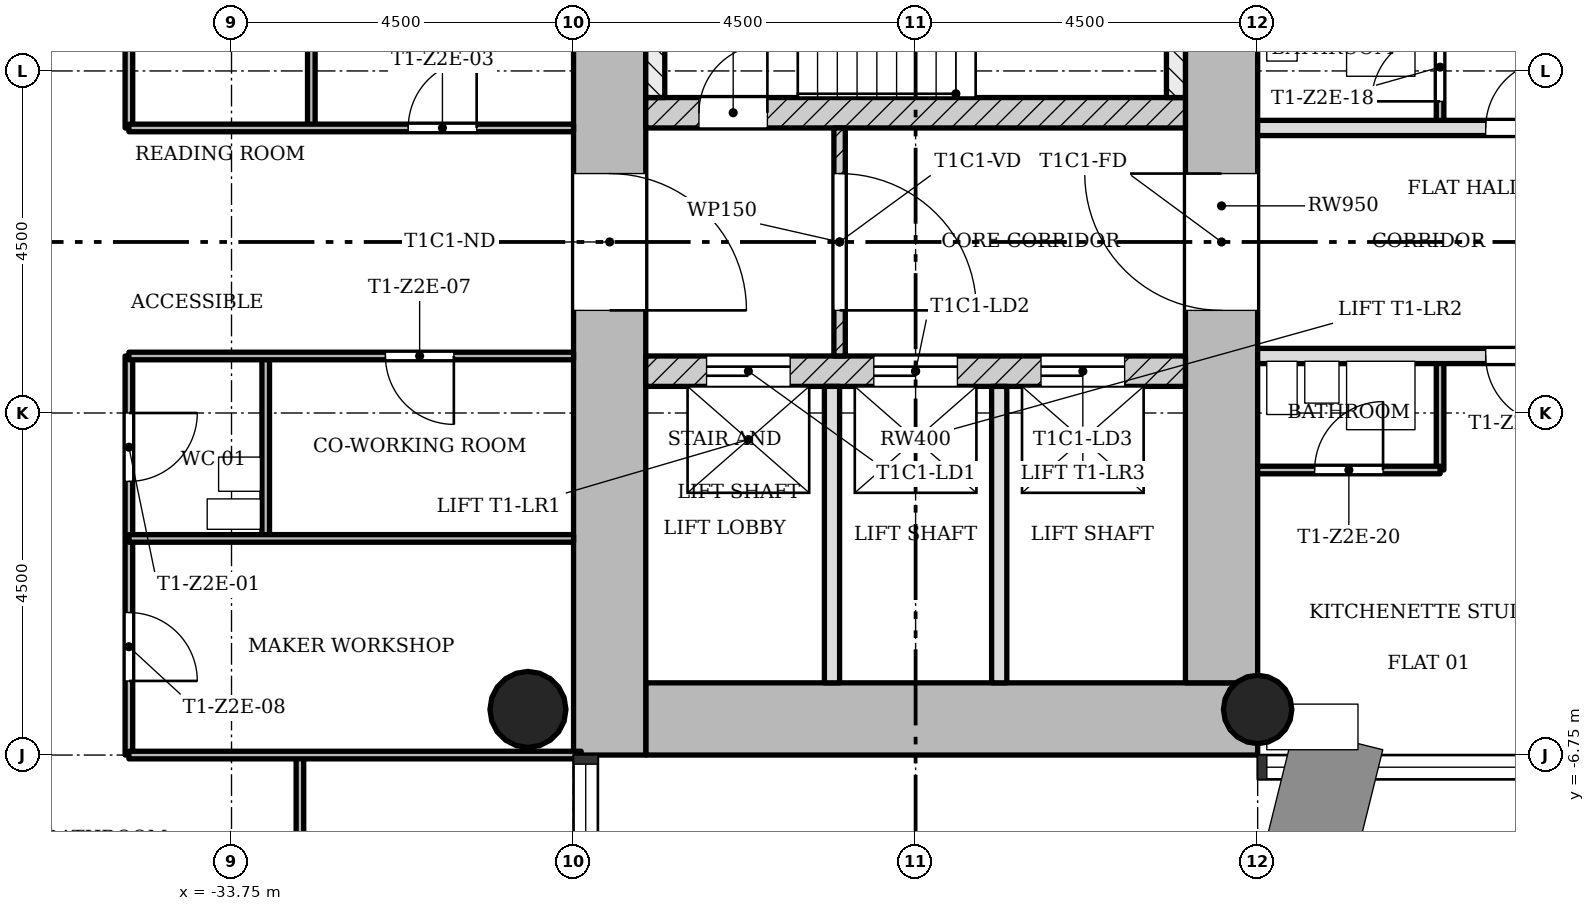
"""IFC4 building model, lengths in metres.
Left out: names, types, materials, properties, quantities, classifications, styles, units other than length and angle.
Written with IfcOpenShell. Run it as: python <this file> out.ifc"""

import sys

from ifc_helpers import new_model, si_unit, direction, frame, frame_2d, origin, origin_2d, place, context, subcontext, project, spatial, rectangle, hollow_circle, extrude, element, fill, save


model = new_model("IFC4")
c1 = context("Model", 3, precision=1e-05, world=origin(), true_north=direction((0.0, 1.0)))
c2 = subcontext(c1, "Body", "Model", "MODEL_VIEW")
j1 = project(units=[si_unit("LENGTHUNIT", "METRE"), si_unit("PLANEANGLEUNIT", "RADIAN")], contexts=[c1])
p1 = place(None, origin())
s1 = spatial("IfcSite", under=j1, at=p1, CompositionType="ELEMENT")
p2 = place(p1, origin())
s2 = spatial("IfcBuilding", under=s1, at=p2, CompositionType="ELEMENT")
p3 = place(p2, frame((0.0, 0.0, 100.4)))
s3 = spatial("IfcBuildingStorey", under=s2, at=p3, CompositionType="ELEMENT", Elevation=100.4)
p4 = place(p3, frame((-28.3, -6.275, 0.0), z_axis=(0.0, 0.0, 1.0), x_axis=(1.0, 0.0, 0.0)))
e1 = element("IfcWall", 1, at=p4, inside=s3, PredefinedType="SHEAR", context=c2, shape_type="SweptSolid", body=[
    extrude(rectangle(XDim=8.05, YDim=0.95, at=frame_2d((4.025, 0.0))), origin(), (0.0, 0.0, 1.0), 3.4),
])
p5 = place(p3, frame((-20.725, -5.8, 0.0), z_axis=(0.0, 0.0, 1.0), x_axis=(0.0, 1.0, 0.0)))
e2 = element("IfcWall", 2, at=p5, inside=s3, PredefinedType="SHEAR", context=c2, shape_type="SweptSolid", body=[
    extrude(rectangle(XDim=12.55, YDim=0.95, at=frame_2d((6.275, 0.0))), origin(), (0.0, 0.0, 1.0), 3.4),
])
p6 = place(p5, frame((4.9, 0.0, 0.0)))
e3 = element("IfcOpeningElement", 3, at=p6, cuts=e2, PredefinedType="OPENING", context=c2, shape_type="SweptSolid", body=[
    extrude(rectangle(XDim=1.8, YDim=2.1, at=frame_2d((0.9, 1.05))), frame((0.0, 0.485, 0.0), z_axis=(0.0, -1.0, 0.0), x_axis=(1.0, 0.0, 0.0)), (0.0, 0.0, 1.0), 0.97),
])
p7 = place(p3, frame((-28.775, 5.8, 0.0), z_axis=(0.0, 0.0, 1.0), x_axis=(0.0, -1.0, 0.0)))
e4 = element("IfcWall", 4, at=p7, inside=s3, PredefinedType="SHEAR", context=c2, shape_type="SweptSolid", body=[
    extrude(rectangle(XDim=12.55, YDim=0.95, at=frame_2d((6.275, 0.0))), origin(), (0.0, 0.0, 1.0), 3.4),
])
p8 = place(p7, frame((4.9, 0.0, 0.0)))
e5 = element("IfcOpeningElement", 5, at=p8, cuts=e4, PredefinedType="OPENING", context=c2, shape_type="SweptSolid", body=[
    extrude(rectangle(XDim=1.8, YDim=2.1, at=frame_2d((0.9, 1.05))), frame((0.0, 0.485, 0.0), z_axis=(0.0, -1.0, 0.0), x_axis=(1.0, 0.0, 0.0)), (0.0, 0.0, 1.0), 0.97),
])
p9 = place(p3, frame((-28.3, -1.7, 0.0), z_axis=(0.0, 0.0, 1.0), x_axis=(1.0, 0.0, 0.0)))
e6 = element("IfcWall", 6, at=p9, inside=s3, PredefinedType="SHEAR", context=c2, shape_type="SweptSolid", body=[
    extrude(rectangle(XDim=7.1, YDim=0.4, at=frame_2d((3.55, 0.0))), origin(), (0.0, 0.0, 1.0), 3.4),
])
p10 = place(p9, frame((0.8, 0.0, 0.0)))
e7 = element("IfcOpeningElement", 7, at=p10, cuts=e6, PredefinedType="OPENING", context=c2, shape_type="SweptSolid", body=[
    extrude(rectangle(XDim=1.1, YDim=2.1, at=frame_2d((0.55, 1.05))), frame((0.0, 0.21, 0.0), z_axis=(0.0, -1.0, 0.0), x_axis=(1.0, 0.0, 0.0)), (0.0, 0.0, 1.0), 0.42),
])
p11 = place(p9, frame((3.0, 0.0, 0.0)))
e8 = element("IfcOpeningElement", 8, at=p11, cuts=e6, PredefinedType="OPENING", context=c2, shape_type="SweptSolid", body=[
    extrude(rectangle(XDim=1.1, YDim=2.1, at=frame_2d((0.55, 1.05))), frame((0.0, 0.21, 0.0), z_axis=(0.0, -1.0, 0.0), x_axis=(1.0, 0.0, 0.0)), (0.0, 0.0, 1.0), 0.42),
])
p12 = place(p9, frame((5.2, 0.0, 0.0)))
e9 = element("IfcOpeningElement", 9, at=p12, cuts=e6, PredefinedType="OPENING", context=c2, shape_type="SweptSolid", body=[
    extrude(rectangle(XDim=1.1, YDim=2.1, at=frame_2d((0.55, 1.05))), frame((0.0, 0.21, 0.0), z_axis=(0.0, -1.0, 0.0), x_axis=(1.0, 0.0, 0.0)), (0.0, 0.0, 1.0), 0.42),
])
p13 = place(p3, frame((-28.3, 1.7, 0.0), z_axis=(0.0, 0.0, 1.0), x_axis=(1.0, 0.0, 0.0)))
e10 = element("IfcWall", 10, at=p13, inside=s3, PredefinedType="SHEAR", context=c2, shape_type="SweptSolid", body=[
    extrude(rectangle(XDim=7.1, YDim=0.4, at=frame_2d((3.55, 0.0))), origin(), (0.0, 0.0, 1.0), 3.4),
])
p14 = place(p13, frame((0.7, 0.0, 0.0)))
e11 = element("IfcOpeningElement", 11, at=p14, cuts=e10, PredefinedType="OPENING", context=c2, shape_type="SweptSolid", body=[
    extrude(rectangle(XDim=0.9, YDim=2.1, at=frame_2d((0.45, 1.05))), frame((0.0, 0.21, 0.0), z_axis=(0.0, -1.0, 0.0), x_axis=(1.0, 0.0, 0.0)), (0.0, 0.0, 1.0), 0.42),
])
p15 = place(p3, frame((-20.25, -6.15, 0.0), z_axis=(0.0, 0.0, 1.0), x_axis=(1.0, 0.0, 0.0)))
e12 = element("IfcColumn", 12, at=p15, inside=s3, PredefinedType="COLUMN", context=c2, shape_type="SweptSolid", body=[
    extrude(hollow_circle(Radius=0.45, WallThickness=0.032, at=origin_2d()), origin(), (0.0, 0.0, 1.0), 3.4),
])
p16 = place(p3, frame((-29.85, -6.15, 0.0), z_axis=(0.0, 0.0, 1.0), x_axis=(1.0, 0.0, 0.0)))
e13 = element("IfcColumn", 13, at=p16, inside=s3, PredefinedType="COLUMN", context=c2, shape_type="SweptSolid", body=[
    extrude(hollow_circle(Radius=0.5, WallThickness=0.036, at=origin_2d()), origin(), (0.0, 0.0, 1.0), 3.4),
])
p17 = place(p3, frame((-25.75, -1.5, 0.0), z_axis=(0.0, 0.0, 1.0), x_axis=(0.0, 1.0, 0.0)))
e14 = element("IfcWall", 14, at=p17, inside=s3, PredefinedType="PARTITIONING", context=c2, shape_type="SweptSolid", body=[
    extrude(rectangle(XDim=3.0, YDim=0.15, at=frame_2d((1.5, 0.0))), origin(), (0.0, 0.0, 1.0), 3.0),
])
p18 = place(p17, frame((0.6, 0.0, 0.0)))
e15 = element("IfcOpeningElement", 15, at=p18, cuts=e14, PredefinedType="OPENING", context=c2, shape_type="SweptSolid", body=[
    extrude(rectangle(XDim=1.8, YDim=2.1, at=frame_2d((0.9, 1.05))), frame((0.0, 0.085, 0.0), z_axis=(0.0, -1.0, 0.0), x_axis=(1.0, 0.0, 0.0)), (0.0, 0.0, 1.0), 0.17),
])
for number, where, z_axis, x_axis in (
    (16, (-25.85, -5.8, 0.0), (0.0, 0.0, 1.0), (0.0, 1.0, 0.0)),
    (17, (-23.65, -5.8, 0.0), (0.0, 0.0, 1.0), (0.0, 1.0, 0.0)),
):
    element("IfcWall", number, at=place(p3, frame(where, z_axis=z_axis, x_axis=x_axis)), inside=s3, PredefinedType="SOLIDWALL", context=c2, shape_type="SweptSolid", body=[
        extrude(rectangle(XDim=3.9, YDim=0.2, at=frame_2d((1.95, 0.0))), origin(), (0.0, 0.0, 1.0), 3.0),
    ])
p19 = place(p3, frame((-35.1, -6.75, 0.0), z_axis=(0.0, 0.0, 1.0), x_axis=(0.0, 1.0, 0.0)))
e18 = element("IfcWall", 18, at=p19, inside=s3, PredefinedType="PARTITIONING", context=c2, shape_type="SweptSolid", body=[
    extrude(rectangle(XDim=5.25, YDim=0.1, at=frame_2d((2.625, 0.0))), origin(), (0.0, 0.0, 1.0), 3.0),
])
p20 = place(p19, frame((3.6, 0.0, 0.0)))
e19 = element("IfcOpeningElement", 19, at=p20, cuts=e18, PredefinedType="OPENING", context=c2, shape_type="SweptSolid", body=[
    extrude(rectangle(XDim=0.9, YDim=2.1, at=frame_2d((0.45, 1.05))), frame((0.0, 0.06, 0.0), z_axis=(0.0, -1.0, 0.0), x_axis=(1.0, 0.0, 0.0)), (0.0, 0.0, 1.0), 0.12),
])
p21 = place(p19, frame((0.975, 0.0, 0.0)))
e20 = element("IfcOpeningElement", 20, at=p21, cuts=e18, PredefinedType="OPENING", context=c2, shape_type="SweptSolid", body=[
    extrude(rectangle(XDim=0.9, YDim=2.1, at=frame_2d((0.45, 1.05))), frame((0.0, 0.06, 0.0), z_axis=(0.0, -1.0, 0.0), x_axis=(1.0, 0.0, 0.0)), (0.0, 0.0, 1.0), 0.12),
])
p22 = place(p3, frame((-35.1, 1.5, 0.0), z_axis=(0.0, 0.0, 1.0), x_axis=(0.0, 1.0, 0.0)))
e21 = element("IfcWall", 21, at=p22, inside=s3, PredefinedType="PARTITIONING", context=c2, shape_type="SweptSolid", body=[
    extrude(rectangle(XDim=5.25, YDim=0.1, at=frame_2d((2.625, 0.0))), origin(), (0.0, 0.0, 1.0), 3.0),
])
p23 = place(p22, frame((2.175, 0.0, 0.0)))
e22 = element("IfcOpeningElement", 22, at=p23, cuts=e21, PredefinedType="OPENING", context=c2, shape_type="SweptSolid", body=[
    extrude(rectangle(XDim=0.9, YDim=2.1, at=frame_2d((0.45, 1.05))), frame((0.0, 0.06, 0.0), z_axis=(0.0, -1.0, 0.0), x_axis=(1.0, 0.0, 0.0)), (0.0, 0.0, 1.0), 0.12),
])
p24 = place(p3, frame((-33.3, -3.9, 0.0), z_axis=(0.0, 0.0, 1.0), x_axis=(0.0, 1.0, 0.0)))
e23 = element("IfcWall", 23, at=p24, inside=s3, PredefinedType="PARTITIONING", context=c2, shape_type="SweptSolid", body=[
    extrude(rectangle(XDim=2.4, YDim=0.1, at=frame_2d((1.2, 0.0))), origin(), (0.0, 0.0, 1.0), 3.0),
])
p25 = place(p3, frame((-32.85, -15.75, 0.0), z_axis=(0.0, 0.0, 1.0), x_axis=(0.0, 1.0, 0.0)))
e24 = element("IfcWall", 24, at=p25, inside=s3, PredefinedType="PARTITIONING", context=c2, shape_type="SweptSolid", body=[
    extrude(rectangle(XDim=9.0, YDim=0.1, at=frame_2d((4.5, 0.0))), origin(), (0.0, 0.0, 1.0), 3.0),
])
p26 = place(p25, frame((5.55, 0.0, 0.0)))
e25 = element("IfcOpeningElement", 25, at=p26, cuts=e24, PredefinedType="OPENING", context=c2, shape_type="SweptSolid", body=[
    extrude(rectangle(XDim=0.9, YDim=2.1, at=frame_2d((0.45, 1.05))), frame((0.0, 0.06, 0.0), z_axis=(0.0, -1.0, 0.0), x_axis=(1.0, 0.0, 0.0)), (0.0, 0.0, 1.0), 0.12),
])
p27 = place(p3, frame((-32.7, 1.5, 0.0), z_axis=(0.0, 0.0, 1.0), x_axis=(0.0, 1.0, 0.0)))
e26 = element("IfcWall", 26, at=p27, inside=s3, PredefinedType="PARTITIONING", context=c2, shape_type="SweptSolid", body=[
    extrude(rectangle(XDim=5.25, YDim=0.1, at=frame_2d((2.625, 0.0))), origin(), (0.0, 0.0, 1.0), 3.0),
])
p28 = place(p3, frame((-17.85, -3.0, 0.0), z_axis=(0.0, 0.0, 1.0), x_axis=(0.0, 1.0, 0.0)))
e27 = element("IfcWall", 27, at=p28, inside=s3, PredefinedType="PARTITIONING", context=c2, shape_type="SweptSolid", body=[
    extrude(rectangle(XDim=1.5, YDim=0.1, at=frame_2d((0.75, 0.0))), origin(), (0.0, 0.0, 1.0), 3.0),
])
p29 = place(p3, frame((-17.85, 1.5, 0.0), z_axis=(0.0, 0.0, 1.0), x_axis=(0.0, 1.0, 0.0)))
e28 = element("IfcWall", 28, at=p29, inside=s3, PredefinedType="PARTITIONING", context=c2, shape_type="SweptSolid", body=[
    extrude(rectangle(XDim=1.65, YDim=0.1, at=frame_2d((0.825, 0.0))), origin(), (0.0, 0.0, 1.0), 3.0),
])
p30 = place(p29, frame((0.35, 0.0, 0.0)))
e29 = element("IfcOpeningElement", 29, at=p30, cuts=e28, PredefinedType="OPENING", context=c2, shape_type="SweptSolid", body=[
    extrude(rectangle(XDim=0.9, YDim=2.1, at=frame_2d((0.45, 1.05))), frame((0.0, 0.06, 0.0), z_axis=(0.0, -1.0, 0.0), x_axis=(1.0, 0.0, 0.0)), (0.0, 0.0, 1.0), 0.12),
])
p31 = place(p3, frame((-35.1, -6.75, 0.0), z_axis=(0.0, 0.0, 1.0), x_axis=(1.0, 0.0, 0.0)))
e30 = element("IfcWall", 30, at=p31, inside=s3, PredefinedType="PARTITIONING", context=c2, shape_type="SweptSolid", body=[
    extrude(rectangle(XDim=5.95, YDim=0.1, at=frame_2d((2.975, 0.0))), origin(), (0.0, 0.0, 1.0), 3.0),
])
p32 = place(p3, frame((-35.1, -3.9, 0.0), z_axis=(0.0, 0.0, 1.0), x_axis=(1.0, 0.0, 0.0)))
e31 = element("IfcWall", 31, at=p32, inside=s3, PredefinedType="PARTITIONING", context=c2, shape_type="SweptSolid", body=[
    extrude(rectangle(XDim=5.85, YDim=0.1, at=frame_2d((2.925, 0.0))), origin(), (0.0, 0.0, 1.0), 3.0),
])
p33 = place(p3, frame((-20.25, -3.0, 0.0), z_axis=(0.0, 0.0, 1.0), x_axis=(1.0, 0.0, 0.0)))
e32 = element("IfcWall", 32, at=p33, inside=s3, PredefinedType="PARTITIONING", context=c2, shape_type="SweptSolid", body=[
    extrude(rectangle(XDim=2.4, YDim=0.1, at=frame_2d((1.2, 0.0))), origin(), (0.0, 0.0, 1.0), 3.0),
])
p34 = place(p33, frame((0.75, 0.0, 0.0)))
e33 = element("IfcOpeningElement", 33, at=p34, cuts=e32, PredefinedType="OPENING", context=c2, shape_type="SweptSolid", body=[
    extrude(rectangle(XDim=0.9, YDim=2.1, at=frame_2d((0.45, 1.05))), frame((0.0, 0.06, 0.0), z_axis=(0.0, -1.0, 0.0), x_axis=(1.0, 0.0, 0.0)), (0.0, 0.0, 1.0), 0.12),
])
p35 = place(p3, frame((-35.1, -1.5, 0.0), z_axis=(0.0, 0.0, 1.0), x_axis=(1.0, 0.0, 0.0)))
e34 = element("IfcWall", 34, at=p35, inside=s3, PredefinedType="PARTITIONING", context=c2, shape_type="SweptSolid", body=[
    extrude(rectangle(XDim=5.85, YDim=0.1, at=frame_2d((2.925, 0.0))), origin(), (0.0, 0.0, 1.0), 3.0),
])
p36 = place(p35, frame((3.375, 0.0, 0.0)))
e35 = element("IfcOpeningElement", 35, at=p36, cuts=e34, PredefinedType="OPENING", context=c2, shape_type="SweptSolid", body=[
    extrude(rectangle(XDim=0.9, YDim=2.1, at=frame_2d((0.45, 1.05))), frame((0.0, 0.06, 0.0), z_axis=(0.0, -1.0, 0.0), x_axis=(1.0, 0.0, 0.0)), (0.0, 0.0, 1.0), 0.12),
])
p37 = place(p3, frame((-20.25, -1.5, 0.0), z_axis=(0.0, 0.0, 1.0), x_axis=(1.0, 0.0, 0.0)))
e36 = element("IfcWall", 36, at=p37, inside=s3, PredefinedType="SOLIDWALL", context=c2, shape_type="SweptSolid", body=[
    extrude(rectangle(XDim=4.5, YDim=0.2, at=frame_2d((2.25, 0.0))), origin(), (0.0, 0.0, 1.0), 3.0),
])
p38 = place(p37, frame((3.0, 0.0, 0.0)))
e37 = element("IfcOpeningElement", 37, at=p38, cuts=e36, PredefinedType="OPENING", context=c2, shape_type="SweptSolid", body=[
    extrude(rectangle(XDim=0.9, YDim=2.1, at=frame_2d((0.45, 1.05))), frame((0.0, 0.11, 0.0), z_axis=(0.0, -1.0, 0.0), x_axis=(1.0, 0.0, 0.0)), (0.0, 0.0, 1.0), 0.22),
])
p39 = place(p3, frame((-35.1, 1.5, 0.0), z_axis=(0.0, 0.0, 1.0), x_axis=(1.0, 0.0, 0.0)))
e38 = element("IfcWall", 38, at=p39, inside=s3, PredefinedType="PARTITIONING", context=c2, shape_type="SweptSolid", body=[
    extrude(rectangle(XDim=5.85, YDim=0.1, at=frame_2d((2.925, 0.0))), origin(), (0.0, 0.0, 1.0), 3.0),
])
p40 = place(p39, frame((3.675, 0.0, 0.0)))
e39 = element("IfcOpeningElement", 39, at=p40, cuts=e38, PredefinedType="OPENING", context=c2, shape_type="SweptSolid", body=[
    extrude(rectangle(XDim=0.9, YDim=2.1, at=frame_2d((0.45, 1.05))), frame((0.0, 0.06, 0.0), z_axis=(0.0, -1.0, 0.0), x_axis=(1.0, 0.0, 0.0)), (0.0, 0.0, 1.0), 0.12),
])
p41 = place(p3, frame((-20.25, 1.5, 0.0), z_axis=(0.0, 0.0, 1.0), x_axis=(1.0, 0.0, 0.0)))
e40 = element("IfcWall", 40, at=p41, inside=s3, PredefinedType="SOLIDWALL", context=c2, shape_type="SweptSolid", body=[
    extrude(rectangle(XDim=4.5, YDim=0.2, at=frame_2d((2.25, 0.0))), origin(), (0.0, 0.0, 1.0), 3.0),
])
p42 = place(p41, frame((3.0, 0.0, 0.0)))
e41 = element("IfcOpeningElement", 41, at=p42, cuts=e40, PredefinedType="OPENING", context=c2, shape_type="SweptSolid", body=[
    extrude(rectangle(XDim=0.9, YDim=2.1, at=frame_2d((0.45, 1.05))), frame((0.0, 0.11, 0.0), z_axis=(0.0, -1.0, 0.0), x_axis=(1.0, 0.0, 0.0)), (0.0, 0.0, 1.0), 0.22),
])
for number, where, z_axis, x_axis in (
    (42, (-21.325, 1.9, 0.0), (0.0, 0.0, 1.0), (0.0, 1.0, 0.0)),
    (43, (-28.175, 1.9, 0.0), (0.0, 0.0, 1.0), (0.0, 1.0, 0.0)),
):
    element("IfcWall", number, at=place(p3, frame(where, z_axis=z_axis, x_axis=x_axis)), inside=s3, PredefinedType="SHEAR", context=c2, shape_type="SweptSolid", body=[
        extrude(rectangle(XDim=3.9, YDim=0.25, at=frame_2d((1.95, 0.0))), origin(), (0.0, 0.0, 1.0), 3.4),
    ])
p43 = place(p18, origin())
e44 = element("IfcDoor", 44, at=p43, inside=s3, OperationType="SINGLE_SWING_LEFT", PredefinedType="DOOR", context=c2, shape_type="SweptSolid", body=[
    extrude(rectangle(XDim=1.8, YDim=2.1, at=frame_2d((0.9, 1.05))), frame((0.0, 0.025, 0.0), z_axis=(0.0, -1.0, 0.0), x_axis=(1.0, 0.0, 0.0)), (0.0, 0.0, 1.0), 0.05),
])
fill(e15, e44)
p44 = place(p20, origin())
e45 = element("IfcDoor", 45, at=p44, inside=s3, OperationType="SINGLE_SWING_RIGHT", PredefinedType="DOOR", context=c2, shape_type="SweptSolid", body=[
    extrude(rectangle(XDim=0.9, YDim=2.1, at=frame_2d((0.45, 1.05))), frame((0.0, 0.025, 0.0), z_axis=(0.0, -1.0, 0.0), x_axis=(1.0, 0.0, 0.0)), (0.0, 0.0, 1.0), 0.05),
])
fill(e19, e45)
p45 = place(p40, origin())
e46 = element("IfcDoor", 46, at=p45, inside=s3, OperationType="SINGLE_SWING_LEFT", PredefinedType="DOOR", context=c2, shape_type="SweptSolid", body=[
    extrude(rectangle(XDim=0.9, YDim=2.1, at=frame_2d((0.45, 1.05))), frame((0.0, 0.025, 0.0), z_axis=(0.0, -1.0, 0.0), x_axis=(1.0, 0.0, 0.0)), (0.0, 0.0, 1.0), 0.05),
])
fill(e39, e46)
p46 = place(p36, origin())
e47 = element("IfcDoor", 47, at=p46, inside=s3, OperationType="SINGLE_SWING_RIGHT", PredefinedType="DOOR", context=c2, shape_type="SweptSolid", body=[
    extrude(rectangle(XDim=0.9, YDim=2.1, at=frame_2d((0.45, 1.05))), frame((0.0, 0.025, 0.0), z_axis=(0.0, -1.0, 0.0), x_axis=(1.0, 0.0, 0.0)), (0.0, 0.0, 1.0), 0.05),
])
fill(e35, e47)
p47 = place(p21, origin())
e48 = element("IfcDoor", 48, at=p47, inside=s3, OperationType="SINGLE_SWING_LEFT", PredefinedType="DOOR", context=c2, shape_type="SweptSolid", body=[
    extrude(rectangle(XDim=0.9, YDim=2.1, at=frame_2d((0.45, 1.05))), frame((0.0, 0.025, 0.0), z_axis=(0.0, -1.0, 0.0), x_axis=(1.0, 0.0, 0.0)), (0.0, 0.0, 1.0), 0.05),
])
fill(e20, e48)
p48 = place(p42, origin())
e49 = element("IfcDoor", 49, at=p48, inside=s3, OperationType="SINGLE_SWING_LEFT", PredefinedType="DOOR", context=c2, shape_type="SweptSolid", body=[
    extrude(rectangle(XDim=0.9, YDim=2.1, at=frame_2d((0.45, 1.05))), frame((0.0, 0.025, 0.0), z_axis=(0.0, -1.0, 0.0), x_axis=(1.0, 0.0, 0.0)), (0.0, 0.0, 1.0), 0.05),
])
fill(e41, e49)
p49 = place(p30, origin())
e50 = element("IfcDoor", 50, at=p49, inside=s3, OperationType="SINGLE_SWING_RIGHT", PredefinedType="DOOR", context=c2, shape_type="SweptSolid", body=[
    extrude(rectangle(XDim=0.9, YDim=2.1, at=frame_2d((0.45, 1.05))), frame((0.0, 0.025, 0.0), z_axis=(0.0, -1.0, 0.0), x_axis=(1.0, 0.0, 0.0)), (0.0, 0.0, 1.0), 0.05),
])
fill(e29, e50)
p50 = place(p38, origin())
e51 = element("IfcDoor", 51, at=p50, inside=s3, OperationType="SINGLE_SWING_RIGHT", PredefinedType="DOOR", context=c2, shape_type="SweptSolid", body=[
    extrude(rectangle(XDim=0.9, YDim=2.1, at=frame_2d((0.45, 1.05))), frame((0.0, 0.025, 0.0), z_axis=(0.0, -1.0, 0.0), x_axis=(1.0, 0.0, 0.0)), (0.0, 0.0, 1.0), 0.05),
])
fill(e37, e51)
p51 = place(p34, origin())
e52 = element("IfcDoor", 52, at=p51, inside=s3, OperationType="SINGLE_SWING_LEFT", PredefinedType="DOOR", context=c2, shape_type="SweptSolid", body=[
    extrude(rectangle(XDim=0.9, YDim=2.1, at=frame_2d((0.45, 1.05))), frame((0.0, 0.025, 0.0), z_axis=(0.0, -1.0, 0.0), x_axis=(1.0, 0.0, 0.0)), (0.0, 0.0, 1.0), 0.05),
])
fill(e33, e52)
p52 = place(p14, origin())
e53 = element("IfcDoor", 53, at=p52, inside=s3, OperationType="SINGLE_SWING_LEFT", PredefinedType="DOOR", context=c2, shape_type="SweptSolid", body=[
    extrude(rectangle(XDim=0.9, YDim=2.1, at=frame_2d((0.45, 1.05))), frame((0.0, 0.025, 0.0), z_axis=(0.0, -1.0, 0.0), x_axis=(1.0, 0.0, 0.0)), (0.0, 0.0, 1.0), 0.05),
])
fill(e11, e53)
p53 = place(p10, origin())
e54 = element("IfcDoor", 54, at=p53, inside=s3, OperationType="SLIDING_TO_LEFT", PredefinedType="DOOR", context=c2, shape_type="SweptSolid", body=[
    extrude(rectangle(XDim=1.1, YDim=2.1, at=frame_2d((0.55, 1.05))), frame((0.0, 0.025, 0.0), z_axis=(0.0, -1.0, 0.0), x_axis=(1.0, 0.0, 0.0)), (0.0, 0.0, 1.0), 0.05),
])
fill(e7, e54)
p54 = place(p11, origin())
e55 = element("IfcDoor", 55, at=p54, inside=s3, OperationType="SLIDING_TO_LEFT", PredefinedType="DOOR", context=c2, shape_type="SweptSolid", body=[
    extrude(rectangle(XDim=1.1, YDim=2.1, at=frame_2d((0.55, 1.05))), frame((0.0, 0.025, 0.0), z_axis=(0.0, -1.0, 0.0), x_axis=(1.0, 0.0, 0.0)), (0.0, 0.0, 1.0), 0.05),
])
fill(e8, e55)
p55 = place(p12, origin())
e56 = element("IfcDoor", 56, at=p55, inside=s3, OperationType="SLIDING_TO_LEFT", PredefinedType="DOOR", context=c2, shape_type="SweptSolid", body=[
    extrude(rectangle(XDim=1.1, YDim=2.1, at=frame_2d((0.55, 1.05))), frame((0.0, 0.025, 0.0), z_axis=(0.0, -1.0, 0.0), x_axis=(1.0, 0.0, 0.0)), (0.0, 0.0, 1.0), 0.05),
])
fill(e9, e56)
p56 = place(p8, origin())
e57 = element("IfcDoor", 57, at=p56, inside=s3, OperationType="SINGLE_SWING_LEFT", PredefinedType="DOOR", context=c2, shape_type="SweptSolid", body=[
    extrude(rectangle(XDim=1.8, YDim=2.1, at=frame_2d((0.9, 1.05))), frame((0.0, 0.025, 0.0), z_axis=(0.0, -1.0, 0.0), x_axis=(1.0, 0.0, 0.0)), (0.0, 0.0, 1.0), 0.05),
])
fill(e5, e57)
p57 = place(p6, origin())
e58 = element("IfcDoor", 58, at=p57, inside=s3, OperationType="SINGLE_SWING_LEFT", PredefinedType="DOOR", context=c2, shape_type="SweptSolid", body=[
    extrude(rectangle(XDim=1.8, YDim=2.1, at=frame_2d((0.9, 1.05))), frame((0.0, 0.025, 0.0), z_axis=(0.0, -1.0, 0.0), x_axis=(1.0, 0.0, 0.0)), (0.0, 0.0, 1.0), 0.05),
])
fill(e3, e58)
save(model, sys.argv[1])
